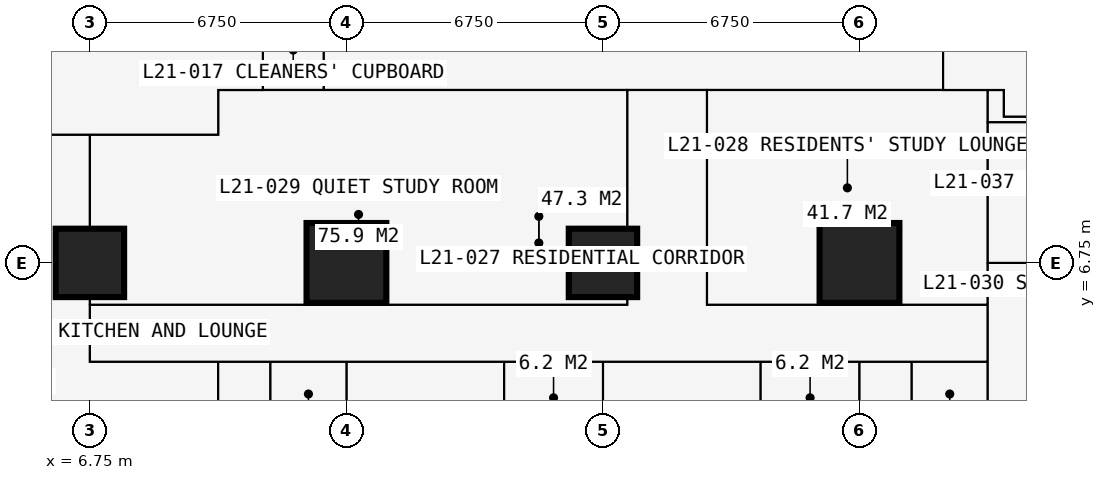
"""IFC4 building model, lengths in metres.
Left out: names, types, materials, properties, quantities, classifications, styles, units other than length and angle.
Written with IfcOpenShell. Run it as: python <this file> out.ifc"""

import sys

from ifc_helpers import new_model, si_unit, direction, frame, frame_2d, origin, origin_2d, place, context, subcontext, project, spatial, rectangle, extrude, element, fill, save


model = new_model("IFC4")
c1 = context("Model", 3, precision=1e-05, world=origin(), true_north=direction((0.0, 1.0)))
c2 = subcontext(c1, "Body", "Model", "MODEL_VIEW")
j1 = project(units=[si_unit("LENGTHUNIT", "METRE"), si_unit("PLANEANGLEUNIT", "RADIAN")], contexts=[c1])
p1 = place(None, origin())
s1 = spatial("IfcSite", under=j1, at=p1, CompositionType="ELEMENT")
p2 = place(p1, origin())
s2 = spatial("IfcBuilding", under=s1, at=p2, CompositionType="ELEMENT")
p3 = place(p2, frame((0.0, 0.0, 80.1)))
s3 = spatial("IfcBuildingStorey", under=s2, at=p3, CompositionType="ELEMENT", Elevation=80.1)
p4 = place(p3, frame((6.75, 6.75, 0.0), z_axis=(0.0, 0.0, 1.0), x_axis=(1.0, 0.0, 0.0)))
e1 = element("IfcColumn", 1, at=p4, inside=s3, PredefinedType="COLUMN", context=c2, shape_type="SweptSolid", body=[
    extrude(rectangle(XDim=1.8, YDim=1.8, at=origin_2d()), origin(), (0.0, 0.0, 1.0), 3.6),
])
p5 = place(p3, frame((13.5, 6.75, 0.0), z_axis=(0.0, 0.0, 1.0), x_axis=(1.0, 0.0, 0.0)))
e2 = element("IfcColumn", 2, at=p5, inside=s3, PredefinedType="COLUMN", context=c2, shape_type="SweptSolid", body=[
    extrude(rectangle(XDim=2.1, YDim=2.1, at=origin_2d()), origin(), (0.0, 0.0, 1.0), 3.6),
])
p6 = place(p3, frame((20.25, 6.75, 0.0), z_axis=(0.0, 0.0, 1.0), x_axis=(1.0, 0.0, 0.0)))
e3 = element("IfcColumn", 3, at=p6, inside=s3, PredefinedType="COLUMN", context=c2, shape_type="SweptSolid", body=[
    extrude(rectangle(XDim=1.8, YDim=1.8, at=origin_2d()), origin(), (0.0, 0.0, 1.0), 3.6),
])
p7 = place(p3, frame((27.0, 6.75, 0.0), z_axis=(0.0, 0.0, 1.0), x_axis=(1.0, 0.0, 0.0)))
e4 = element("IfcColumn", 4, at=p7, inside=s3, PredefinedType="COLUMN", context=c2, shape_type="SweptSolid", body=[
    extrude(rectangle(XDim=2.1, YDim=2.1, at=origin_2d()), origin(), (0.0, 0.0, 1.0), 3.6),
])
p8 = place(p3, frame((-0.734, 10.125, 0.0), z_axis=(0.0, 0.0, 1.0), x_axis=(1.0, 0.0, 0.0)))
e5 = element("IfcWall", 5, at=p8, inside=s3, PredefinedType="PARTITIONING", context=c2, shape_type="SweptSolid", body=[
    extrude(rectangle(XDim=10.859, YDim=0.15, at=frame_2d((5.429, 0.0))), origin(), (0.0, 0.0, 1.0), 3.375),
])
p9 = place(p3, frame((6.75, 4.15, 0.0), z_axis=(0.0, 0.0, 1.0), x_axis=(0.0, 1.0, 0.0)))
e6 = element("IfcWall", 6, at=p9, inside=s3, PredefinedType="PARTITIONING", context=c2, shape_type="SweptSolid", body=[
    extrude(rectangle(XDim=5.975, YDim=0.15, at=frame_2d((2.988, 0.0))), origin(), (0.0, 0.0, 1.0), 2.877),
])
p10 = place(p3, frame((6.75, 4.15, 0.0), z_axis=(0.0, 0.0, 1.0), x_axis=(1.0, 0.0, 0.0)))
e7 = element("IfcWall", 7, at=p10, inside=s3, PredefinedType="PARTITIONING", context=c2, shape_type="SweptSolid", body=[
    extrude(rectangle(XDim=23.625, YDim=0.1, at=frame_2d((11.812, 0.0))), origin(), (0.0, 0.0, 1.0), 3.375),
])
p11 = place(p10, frame((1.2, 0.0, 0.0)))
e8 = element("IfcOpeningElement", 8, at=p11, cuts=e7, PredefinedType="OPENING", context=c2, shape_type="SweptSolid", body=[
    extrude(rectangle(XDim=1.0, YDim=2.2, at=frame_2d((0.5, 1.1))), frame((0.0, 0.06, 0.0), z_axis=(0.0, -1.0, 0.0), x_axis=(1.0, 0.0, 0.0)), (0.0, 0.0, 1.0), 0.12),
])
p12 = place(p10, frame((15.1, 0.0, 0.0)))
e9 = element("IfcOpeningElement", 9, at=p12, cuts=e7, PredefinedType="OPENING", context=c2, shape_type="SweptSolid", body=[
    extrude(rectangle(XDim=0.95, YDim=2.2, at=frame_2d((0.475, 1.1))), frame((0.0, 0.06, 0.0), z_axis=(0.0, -1.0, 0.0), x_axis=(1.0, 0.0, 0.0)), (0.0, 0.0, 1.0), 0.12),
])
p13 = place(p10, frame((8.35, 0.0, 0.0)))
e10 = element("IfcOpeningElement", 10, at=p13, cuts=e7, PredefinedType="OPENING", context=c2, shape_type="SweptSolid", body=[
    extrude(rectangle(XDim=0.95, YDim=2.2, at=frame_2d((0.475, 1.1))), frame((0.0, 0.06, 0.0), z_axis=(0.0, -1.0, 0.0), x_axis=(1.0, 0.0, 0.0)), (0.0, 0.0, 1.0), 0.12),
])
p14 = place(p10, frame((3.575, 0.0, 0.0)))
e11 = element("IfcOpeningElement", 11, at=p14, cuts=e7, PredefinedType="OPENING", context=c2, shape_type="SweptSolid", body=[
    extrude(rectangle(XDim=0.95, YDim=2.2, at=frame_2d((0.475, 1.1))), frame((0.0, 0.06, 0.0), z_axis=(0.0, -1.0, 0.0), x_axis=(1.0, 0.0, 0.0)), (0.0, 0.0, 1.0), 0.12),
])
p15 = place(p10, frame((20.5, 0.0, 0.0)))
e12 = element("IfcOpeningElement", 12, at=p15, cuts=e7, PredefinedType="OPENING", context=c2, shape_type="SweptSolid", body=[
    extrude(rectangle(XDim=0.95, YDim=2.2, at=frame_2d((0.475, 1.1))), frame((0.0, 0.06, 0.0), z_axis=(0.0, -1.0, 0.0), x_axis=(1.0, 0.0, 0.0)), (0.0, 0.0, 1.0), 0.12),
])
p16 = place(p3, frame((6.75, 5.65, 0.0), z_axis=(0.0, 0.0, 1.0), x_axis=(1.0, 0.0, 0.0)))
e13 = element("IfcWall", 13, at=p16, inside=s3, PredefinedType="PARTITIONING", context=c2, shape_type="SweptSolid", body=[
    extrude(rectangle(XDim=14.137, YDim=0.15, at=frame_2d((7.069, 0.0))), origin(), (0.0, 0.0, 1.0), 3.375),
])
p17 = place(p16, frame((7.85, 0.0, 0.0)))
e14 = element("IfcOpeningElement", 14, at=p17, cuts=e13, PredefinedType="OPENING", context=c2, shape_type="SweptSolid", body=[
    extrude(rectangle(XDim=0.95, YDim=2.2, at=frame_2d((0.475, 1.1))), frame((0.0, 0.085, 0.0), z_axis=(0.0, -1.0, 0.0), x_axis=(1.0, 0.0, 0.0)), (0.0, 0.0, 1.0), 0.17),
])
p18 = place(p3, frame((10.125, -0.734, 0.0), z_axis=(0.0, 0.0, 1.0), x_axis=(0.0, 1.0, 0.0)))
e15 = element("IfcWall", 15, at=p18, inside=s3, PredefinedType="PARTITIONING", context=c2, shape_type="SweptSolid", body=[
    extrude(rectangle(XDim=4.884, YDim=0.15, at=frame_2d((2.442, 0.0))), origin(), (0.0, 0.0, 1.0), 3.375),
])
p19 = place(p3, frame((10.125, 10.125, 0.0), z_axis=(0.0, 0.0, 1.0), x_axis=(0.0, 1.0, 0.0)))
e16 = element("IfcWall", 16, at=p19, inside=s3, PredefinedType="PARTITIONING", context=c2, shape_type="SweptSolid", body=[
    extrude(rectangle(XDim=1.175, YDim=0.15, at=frame_2d((0.587, 0.0))), origin(), (0.0, 0.0, 1.0), 3.375),
])
p20 = place(p3, frame((10.125, 11.3, 0.0), z_axis=(0.0, 0.0, 1.0), x_axis=(1.0, 0.0, 0.0)))
e17 = element("IfcWall", 17, at=p20, inside=s3, PredefinedType="PARTITIONING", context=c2, shape_type="SweptSolid", body=[
    extrude(rectangle(XDim=20.675, YDim=0.15, at=frame_2d((10.337, 0.0))), origin(), (0.0, 0.0, 1.0), 3.375),
])
p21 = place(p20, frame((11.312, 0.0, 0.0)))
e18 = element("IfcOpeningElement", 18, at=p21, cuts=e17, PredefinedType="OPENING", context=c2, shape_type="SweptSolid", body=[
    extrude(rectangle(XDim=1.0, YDim=2.2, at=frame_2d((0.5, 1.1))), frame((0.0, 0.085, 0.0), z_axis=(0.0, -1.0, 0.0), x_axis=(1.0, 0.0, 0.0)), (0.0, 0.0, 1.0), 0.17),
])
p22 = place(p3, frame((11.3, 11.3, 0.0), z_axis=(0.0, 0.0, 1.0), x_axis=(0.0, 1.0, 0.0)))
e19 = element("IfcWall", 19, at=p22, inside=s3, PredefinedType="PARTITIONING", context=c2, shape_type="SweptSolid", body=[
    extrude(rectangle(XDim=19.3, YDim=0.15, at=frame_2d((9.65, 0.0))), origin(), (0.0, 0.0, 1.0), 3.375),
])
p23 = place(p22, frame((18.1, 0.0, 0.0)))
e20 = element("IfcOpeningElement", 20, at=p23, cuts=e19, PredefinedType="OPENING", context=c2, shape_type="SweptSolid", body=[
    extrude(rectangle(XDim=1.0, YDim=2.2, at=frame_2d((0.5, 1.1))), frame((0.0, 0.085, 0.0), z_axis=(0.0, -1.0, 0.0), x_axis=(1.0, 0.0, 0.0)), (0.0, 0.0, 1.0), 0.17),
])
p24 = place(p22, frame((10.137, 0.0, 0.0)))
e21 = element("IfcOpeningElement", 21, at=p24, cuts=e19, PredefinedType="OPENING", context=c2, shape_type="SweptSolid", body=[
    extrude(rectangle(XDim=1.0, YDim=2.2, at=frame_2d((0.5, 1.1))), frame((0.0, 0.085, 0.0), z_axis=(0.0, -1.0, 0.0), x_axis=(1.0, 0.0, 0.0)), (0.0, 0.0, 1.0), 0.17),
])
p25 = place(p3, frame((11.5, 1.95, 0.0), z_axis=(0.0, 0.0, 1.0), x_axis=(0.0, 1.0, 0.0)))
e22 = element("IfcWall", 22, at=p25, inside=s3, PredefinedType="PARTITIONING", context=c2, shape_type="SweptSolid", body=[
    extrude(rectangle(XDim=2.2, YDim=0.1, at=frame_2d((1.1, 0.0))), origin(), (0.0, 0.0, 1.0), 3.375),
])
p26 = place(p3, frame((12.9, 11.3, 0.0), z_axis=(0.0, 0.0, 1.0), x_axis=(0.0, 1.0, 0.0)))
e23 = element("IfcWall", 23, at=p26, inside=s3, PredefinedType="PARTITIONING", context=c2, shape_type="SweptSolid", body=[
    extrude(rectangle(XDim=1.6, YDim=0.15, at=frame_2d((0.8, 0.0))), origin(), (0.0, 0.0, 1.0), 3.375),
])
p27 = place(p3, frame((13.5, -0.734, 0.0), z_axis=(0.0, 0.0, 1.0), x_axis=(0.0, 1.0, 0.0)))
e24 = element("IfcWall", 24, at=p27, inside=s3, PredefinedType="PARTITIONING", context=c2, shape_type="SweptSolid", body=[
    extrude(rectangle(XDim=4.884, YDim=0.175, at=frame_2d((2.442, 0.0))), origin(), (0.0, 0.0, 1.0), 2.877),
])
p28 = place(p27, frame((3.334, 0.0, 0.0)))
e25 = element("IfcOpeningElement", 25, at=p28, cuts=e24, PredefinedType="OPENING", context=c2, shape_type="SweptSolid", body=[
    extrude(rectangle(XDim=0.9, YDim=2.2, at=frame_2d((0.45, 1.1))), frame((0.0, 0.097, 0.0), z_axis=(0.0, -1.0, 0.0), x_axis=(1.0, 0.0, 0.0)), (0.0, 0.0, 1.0), 0.195),
])
p29 = place(p3, frame((17.65, 1.75, 0.0), z_axis=(0.0, 0.0, 1.0), x_axis=(0.0, 1.0, 0.0)))
e26 = element("IfcWall", 26, at=p29, inside=s3, PredefinedType="PARTITIONING", context=c2, shape_type="SweptSolid", body=[
    extrude(rectangle(XDim=2.4, YDim=0.1, at=frame_2d((1.2, 0.0))), origin(), (0.0, 0.0, 1.0), 3.375),
])
p30 = place(p3, frame((20.25, -0.734, 0.0), z_axis=(0.0, 0.0, 1.0), x_axis=(0.0, 1.0, 0.0)))
e27 = element("IfcWall", 27, at=p30, inside=s3, PredefinedType="PARTITIONING", context=c2, shape_type="SweptSolid", body=[
    extrude(rectangle(XDim=4.884, YDim=0.175, at=frame_2d((2.442, 0.0))), origin(), (0.0, 0.0, 1.0), 2.61),
])
p31 = place(p30, frame((3.234, 0.0, 0.0)))
e28 = element("IfcOpeningElement", 28, at=p31, cuts=e27, PredefinedType="OPENING", context=c2, shape_type="SweptSolid", body=[
    extrude(rectangle(XDim=0.9, YDim=2.2, at=frame_2d((0.45, 1.1))), frame((0.0, 0.097, 0.0), z_axis=(0.0, -1.0, 0.0), x_axis=(1.0, 0.0, 0.0)), (0.0, 0.0, 1.0), 0.195),
])
p32 = place(p3, frame((20.887, 5.65, 0.0), z_axis=(0.0, 0.0, 1.0), x_axis=(0.0, 1.0, 0.0)))
e29 = element("IfcWall", 29, at=p32, inside=s3, PredefinedType="PARTITIONING", context=c2, shape_type="SweptSolid", body=[
    extrude(rectangle(XDim=5.65, YDim=0.15, at=frame_2d((2.825, 0.0))), origin(), (0.0, 0.0, 1.0), 3.375),
])
p33 = place(p3, frame((22.988, 5.65, 0.0), z_axis=(0.0, 0.0, 1.0), x_axis=(1.0, 0.0, 0.0)))
e30 = element("IfcWall", 30, at=p33, inside=s3, PredefinedType="PARTITIONING", context=c2, shape_type="SweptSolid", body=[
    extrude(rectangle(XDim=7.387, YDim=0.15, at=frame_2d((3.694, 0.0))), origin(), (0.0, 0.0, 1.0), 3.375),
])
p34 = place(p33, frame((2.0, 0.0, 0.0)))
e31 = element("IfcOpeningElement", 31, at=p34, cuts=e30, PredefinedType="OPENING", context=c2, shape_type="SweptSolid", body=[
    extrude(rectangle(XDim=0.95, YDim=2.2, at=frame_2d((0.475, 1.1))), frame((0.0, 0.085, 0.0), z_axis=(0.0, -1.0, 0.0), x_axis=(1.0, 0.0, 0.0)), (0.0, 0.0, 1.0), 0.17),
])
p35 = place(p3, frame((22.988, 5.65, 0.0), z_axis=(0.0, 0.0, 1.0), x_axis=(0.0, 1.0, 0.0)))
e32 = element("IfcWall", 32, at=p35, inside=s3, PredefinedType="PARTITIONING", context=c2, shape_type="SweptSolid", body=[
    extrude(rectangle(XDim=5.65, YDim=0.15, at=frame_2d((2.825, 0.0))), origin(), (0.0, 0.0, 1.0), 3.375),
])
p36 = place(p3, frame((24.4, 1.75, 0.0), z_axis=(0.0, 0.0, 1.0), x_axis=(0.0, 1.0, 0.0)))
e33 = element("IfcWall", 33, at=p36, inside=s3, PredefinedType="PARTITIONING", context=c2, shape_type="SweptSolid", body=[
    extrude(rectangle(XDim=2.4, YDim=0.1, at=frame_2d((1.2, 0.0))), origin(), (0.0, 0.0, 1.0), 3.375),
])
p37 = place(p3, frame((27.0, -0.734, 0.0), z_axis=(0.0, 0.0, 1.0), x_axis=(0.0, 1.0, 0.0)))
e34 = element("IfcWall", 34, at=p37, inside=s3, PredefinedType="PARTITIONING", context=c2, shape_type="SweptSolid", body=[
    extrude(rectangle(XDim=4.884, YDim=0.175, at=frame_2d((2.442, 0.0))), origin(), (0.0, 0.0, 1.0), 2.61),
])
p38 = place(p3, frame((28.375, 1.95, 0.0), z_axis=(0.0, 0.0, 1.0), x_axis=(0.0, 1.0, 0.0)))
e35 = element("IfcWall", 35, at=p38, inside=s3, PredefinedType="PARTITIONING", context=c2, shape_type="SweptSolid", body=[
    extrude(rectangle(XDim=2.2, YDim=0.1, at=frame_2d((1.1, 0.0))), origin(), (0.0, 0.0, 1.0), 3.375),
])
p39 = place(p38, frame((0.65, 0.0, 0.0)))
e36 = element("IfcOpeningElement", 36, at=p39, cuts=e35, PredefinedType="OPENING", context=c2, shape_type="SweptSolid", body=[
    extrude(rectangle(XDim=0.9, YDim=2.2, at=frame_2d((0.45, 1.1))), frame((0.0, 0.06, 0.0), z_axis=(0.0, -1.0, 0.0), x_axis=(1.0, 0.0, 0.0)), (0.0, 0.0, 1.0), 0.12),
])
p40 = place(p3, frame((29.2, 11.3, 0.0), z_axis=(0.0, 0.0, 1.0), x_axis=(0.0, 1.0, 0.0)))
e37 = element("IfcWall", 37, at=p40, inside=s3, PredefinedType="PARTITIONING", context=c2, shape_type="SweptSolid", body=[
    extrude(rectangle(XDim=17.9, YDim=0.2, at=frame_2d((8.95, 0.0))), origin(), (0.0, 0.0, 1.0), 3.375),
])
p41 = place(p40, frame((8.35, 0.0, 0.0)))
e38 = element("IfcOpeningElement", 38, at=p41, cuts=e37, PredefinedType="OPENING", context=c2, shape_type="SweptSolid", body=[
    extrude(rectangle(XDim=1.2, YDim=2.2, at=frame_2d((0.6, 1.1))), frame((0.0, 0.11, 0.0), z_axis=(0.0, -1.0, 0.0), x_axis=(1.0, 0.0, 0.0)), (0.0, 0.0, 1.0), 0.22),
])
p42 = place(p3, frame((30.375, -0.734, 0.0), z_axis=(0.0, 0.0, 1.0), x_axis=(0.0, 1.0, 0.0)))
e39 = element("IfcWall", 39, at=p42, inside=s3, PredefinedType="PARTITIONING", context=c2, shape_type="SweptSolid", body=[
    extrude(rectangle(XDim=12.034, YDim=0.15, at=frame_2d((6.017, 0.0))), origin(), (0.0, 0.0, 1.0), 3.375),
])
p43 = place(p42, frame((5.134, 0.0, 0.0)))
e40 = element("IfcOpeningElement", 40, at=p43, cuts=e39, PredefinedType="OPENING", context=c2, shape_type="SweptSolid", body=[
    extrude(rectangle(XDim=1.0, YDim=2.2, at=frame_2d((0.5, 1.1))), frame((0.0, 0.085, 0.0), z_axis=(0.0, -1.0, 0.0), x_axis=(1.0, 0.0, 0.0)), (0.0, 0.0, 1.0), 0.17),
])
p44 = place(p3, frame((30.375, 6.75, 0.0), z_axis=(0.0, 0.0, 1.0), x_axis=(1.0, 0.0, 0.0)))
e41 = element("IfcWall", 41, at=p44, inside=s3, PredefinedType="PARTITIONING", context=c2, shape_type="SweptSolid", body=[
    extrude(rectangle(XDim=5.975, YDim=0.15, at=frame_2d((2.988, 0.0))), origin(), (0.0, 0.0, 1.0), 2.877),
])
p45 = place(p3, frame((30.375, 10.45, 0.0), z_axis=(0.0, 0.0, 1.0), x_axis=(1.0, 0.0, 0.0)))
e42 = element("IfcWall", 42, at=p45, inside=s3, PredefinedType="PARTITIONING", context=c2, shape_type="SweptSolid", body=[
    extrude(rectangle(XDim=4.475, YDim=0.15, at=frame_2d((2.238, 0.0))), origin(), (0.0, 0.0, 1.0), 3.375),
])
p46 = place(p45, frame((2.35, 0.0, 0.0)))
e43 = element("IfcOpeningElement", 43, at=p46, cuts=e42, PredefinedType="OPENING", context=c2, shape_type="SweptSolid", body=[
    extrude(rectangle(XDim=0.95, YDim=2.2, at=frame_2d((0.475, 1.1))), frame((0.0, 0.085, 0.0), z_axis=(0.0, -1.0, 0.0), x_axis=(1.0, 0.0, 0.0)), (0.0, 0.0, 1.0), 0.17),
])
p47 = place(p3, frame((30.8, 10.6, 0.0), z_axis=(0.0, 0.0, 1.0), x_axis=(0.0, 1.0, 0.0)))
e44 = element("IfcWall", 44, at=p47, inside=s3, PredefinedType="PARTITIONING", context=c2, shape_type="SweptSolid", body=[
    extrude(rectangle(XDim=0.7, YDim=0.15, at=frame_2d((0.35, 0.0))), origin(), (0.0, 0.0, 1.0), 3.375),
])
p48 = place(p3, frame((30.8, 10.6, 0.0), z_axis=(0.0, 0.0, 1.0), x_axis=(1.0, 0.0, 0.0)))
e45 = element("IfcWall", 45, at=p48, inside=s3, PredefinedType="PARTITIONING", context=c2, shape_type="SweptSolid", body=[
    extrude(rectangle(XDim=1.85, YDim=0.15, at=frame_2d((0.925, 0.0))), origin(), (0.0, 0.0, 1.0), 3.375),
])
p49 = place(p11, origin())
e46 = element("IfcDoor", 46, at=p49, inside=s3, OperationType="SINGLE_SWING_LEFT", PredefinedType="DOOR", context=c2, shape_type="SweptSolid", body=[
    extrude(rectangle(XDim=1.0, YDim=2.2, at=frame_2d((0.5, 1.1))), frame((0.0, 0.025, 0.0), z_axis=(0.0, -1.0, 0.0), x_axis=(1.0, 0.0, 0.0)), (0.0, 0.0, 1.0), 0.05),
])
fill(e8, e46)
p50 = place(p12, origin())
e47 = element("IfcDoor", 47, at=p50, inside=s3, OperationType="SINGLE_SWING_LEFT", PredefinedType="DOOR", context=c2, shape_type="SweptSolid", body=[
    extrude(rectangle(XDim=0.95, YDim=2.2, at=frame_2d((0.475, 1.1))), frame((0.0, 0.025, 0.0), z_axis=(0.0, -1.0, 0.0), x_axis=(1.0, 0.0, 0.0)), (0.0, 0.0, 1.0), 0.05),
])
fill(e9, e47)
p51 = place(p13, origin())
e48 = element("IfcDoor", 48, at=p51, inside=s3, OperationType="SINGLE_SWING_LEFT", PredefinedType="DOOR", context=c2, shape_type="SweptSolid", body=[
    extrude(rectangle(XDim=0.95, YDim=2.2, at=frame_2d((0.475, 1.1))), frame((0.0, 0.025, 0.0), z_axis=(0.0, -1.0, 0.0), x_axis=(1.0, 0.0, 0.0)), (0.0, 0.0, 1.0), 0.05),
])
fill(e10, e48)
p52 = place(p31, origin())
e49 = element("IfcDoor", 49, at=p52, inside=s3, OperationType="SINGLE_SWING_RIGHT", PredefinedType="DOOR", context=c2, shape_type="SweptSolid", body=[
    extrude(rectangle(XDim=0.9, YDim=2.2, at=frame_2d((0.45, 1.1))), frame((0.0, 0.025, 0.0), z_axis=(0.0, -1.0, 0.0), x_axis=(1.0, 0.0, 0.0)), (0.0, 0.0, 1.0), 0.05),
])
fill(e28, e49)
p53 = place(p14, origin())
e50 = element("IfcDoor", 50, at=p53, inside=s3, OperationType="SINGLE_SWING_LEFT", PredefinedType="DOOR", context=c2, shape_type="SweptSolid", body=[
    extrude(rectangle(XDim=0.95, YDim=2.2, at=frame_2d((0.475, 1.1))), frame((0.0, 0.025, 0.0), z_axis=(0.0, -1.0, 0.0), x_axis=(1.0, 0.0, 0.0)), (0.0, 0.0, 1.0), 0.05),
])
fill(e11, e50)
p54 = place(p28, origin())
e51 = element("IfcDoor", 51, at=p54, inside=s3, OperationType="SINGLE_SWING_RIGHT", PredefinedType="DOOR", context=c2, shape_type="SweptSolid", body=[
    extrude(rectangle(XDim=0.9, YDim=2.2, at=frame_2d((0.45, 1.1))), frame((0.0, 0.025, 0.0), z_axis=(0.0, -1.0, 0.0), x_axis=(1.0, 0.0, 0.0)), (0.0, 0.0, 1.0), 0.05),
])
fill(e25, e51)
p55 = place(p15, origin())
e52 = element("IfcDoor", 52, at=p55, inside=s3, OperationType="SINGLE_SWING_LEFT", PredefinedType="DOOR", context=c2, shape_type="SweptSolid", body=[
    extrude(rectangle(XDim=0.95, YDim=2.2, at=frame_2d((0.475, 1.1))), frame((0.0, 0.025, 0.0), z_axis=(0.0, -1.0, 0.0), x_axis=(1.0, 0.0, 0.0)), (0.0, 0.0, 1.0), 0.05),
])
fill(e12, e52)
p56 = place(p39, origin())
e53 = element("IfcDoor", 53, at=p56, inside=s3, OperationType="SINGLE_SWING_RIGHT", PredefinedType="DOOR", context=c2, shape_type="SweptSolid", body=[
    extrude(rectangle(XDim=0.9, YDim=2.2, at=frame_2d((0.45, 1.1))), frame((0.0, 0.025, 0.0), z_axis=(0.0, -1.0, 0.0), x_axis=(1.0, 0.0, 0.0)), (0.0, 0.0, 1.0), 0.05),
])
fill(e36, e53)
p57 = place(p21, origin())
e54 = element("IfcDoor", 54, at=p57, inside=s3, OperationType="SINGLE_SWING_LEFT", PredefinedType="DOOR", context=c2, shape_type="SweptSolid", body=[
    extrude(rectangle(XDim=1.0, YDim=2.2, at=frame_2d((0.5, 1.1))), frame((0.0, 0.025, 0.0), z_axis=(0.0, -1.0, 0.0), x_axis=(1.0, 0.0, 0.0)), (0.0, 0.0, 1.0), 0.05),
])
fill(e18, e54)
p58 = place(p34, origin())
e55 = element("IfcDoor", 55, at=p58, inside=s3, OperationType="SINGLE_SWING_LEFT", PredefinedType="DOOR", context=c2, shape_type="SweptSolid", body=[
    extrude(rectangle(XDim=0.95, YDim=2.2, at=frame_2d((0.475, 1.1))), frame((0.0, 0.025, 0.0), z_axis=(0.0, -1.0, 0.0), x_axis=(1.0, 0.0, 0.0)), (0.0, 0.0, 1.0), 0.05),
])
fill(e31, e55)
p59 = place(p17, origin())
e56 = element("IfcDoor", 56, at=p59, inside=s3, OperationType="SINGLE_SWING_LEFT", PredefinedType="DOOR", context=c2, shape_type="SweptSolid", body=[
    extrude(rectangle(XDim=0.95, YDim=2.2, at=frame_2d((0.475, 1.1))), frame((0.0, 0.025, 0.0), z_axis=(0.0, -1.0, 0.0), x_axis=(1.0, 0.0, 0.0)), (0.0, 0.0, 1.0), 0.05),
])
fill(e14, e56)
p60 = place(p43, origin())
e57 = element("IfcDoor", 57, at=p60, inside=s3, OperationType="SINGLE_SWING_LEFT", PredefinedType="DOOR", context=c2, shape_type="SweptSolid", body=[
    extrude(rectangle(XDim=1.0, YDim=2.2, at=frame_2d((0.5, 1.1))), frame((0.0, 0.025, 0.0), z_axis=(0.0, -1.0, 0.0), x_axis=(1.0, 0.0, 0.0)), (0.0, 0.0, 1.0), 0.05),
])
fill(e40, e57)
save(model, sys.argv[1])
